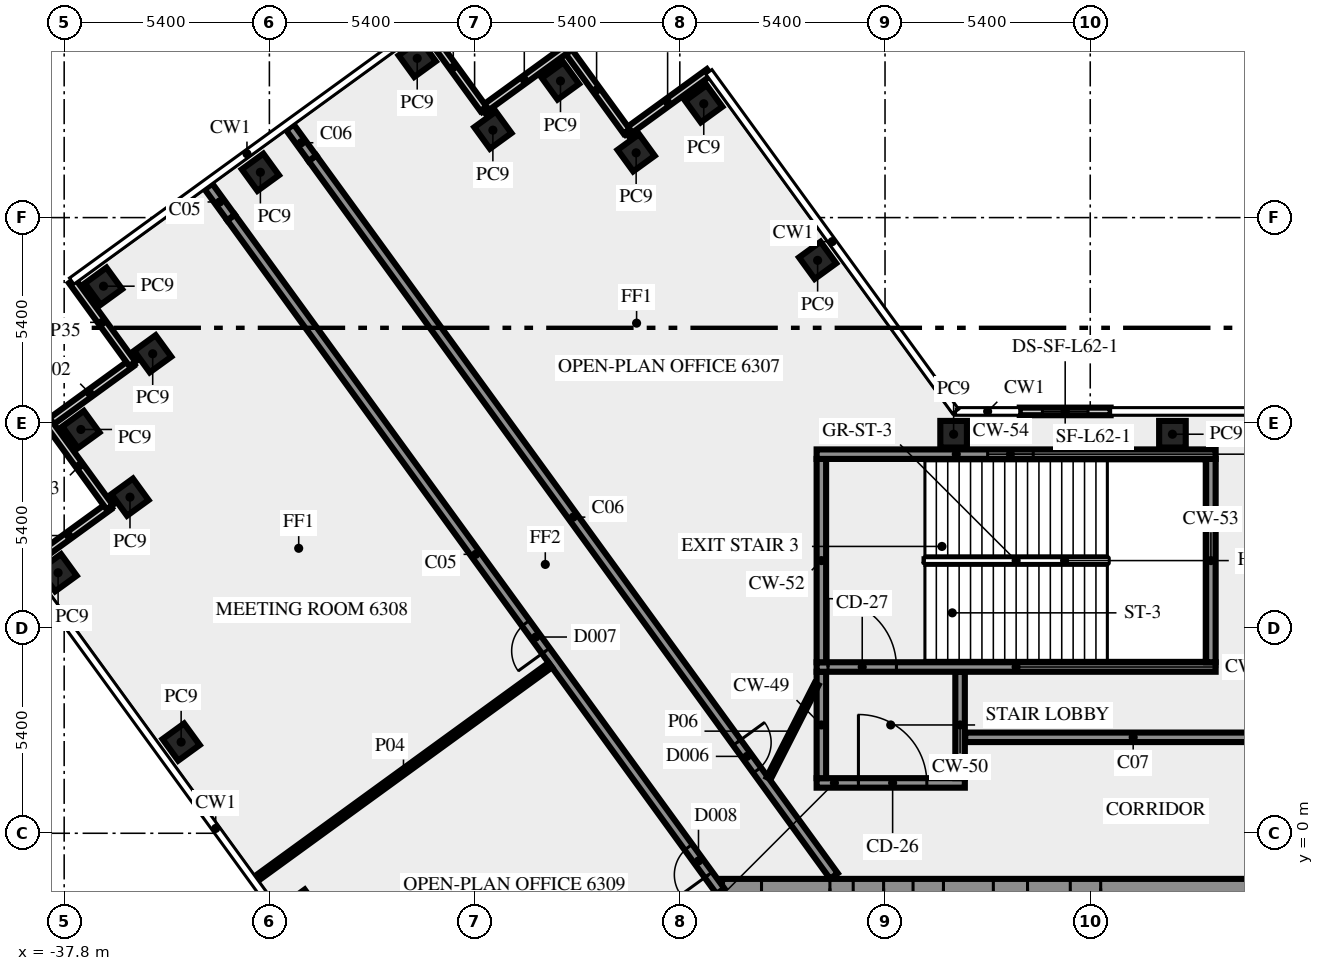
"""IFC4 building model, lengths in metres.
Left out: names, types, materials, properties, quantities, classifications, styles, units other than length and angle.
Written with IfcOpenShell. Run it as: python <this file> out.ifc"""

import sys

from ifc_helpers import new_model, si_unit, direction, frame, frame_2d, origin, origin_2d, place, context, subcontext, project, spatial, rectangle, extrude, element, fill, save


model = new_model("IFC4")
c1 = context("Model", 3, precision=1e-05, world=origin(), true_north=direction((0.0, 1.0)))
c2 = subcontext(c1, "Body", "Model", "MODEL_VIEW")
j1 = project(units=[si_unit("LENGTHUNIT", "METRE"), si_unit("PLANEANGLEUNIT", "RADIAN")], contexts=[c1])
p1 = place(None, origin())
s1 = spatial("IfcSite", under=j1, at=p1, CompositionType="ELEMENT")
p2 = place(p1, origin())
s2 = spatial("IfcBuilding", under=s1, at=p2, CompositionType="ELEMENT")
p3 = place(p2, frame((0.0, 0.0, 269.0)))
s3 = spatial("IfcBuildingStorey", under=s2, at=p3, CompositionType="ELEMENT", Elevation=269.0)
for number, where, z_axis, x_axis in (
    (1, (-17.974, 15.075, 0.0), (0.0, 0.0, 1.0), (-0.588, 0.809, 0.0)),
    (2, (-20.97, 19.195, 0.0), (0.0, 0.0, 1.0), (-0.588, 0.809, 0.0)),
    (3, (-22.749, 17.904, 0.0), (0.0, 0.0, 1.0), (-0.588, 0.809, 0.0)),
    (4, (-24.74, 19.795, 0.0), (0.0, 0.0, 1.0), (-0.588, 0.809, 0.0)),
    (5, (-26.519, 18.5, 0.0), (0.0, 0.0, 1.0), (-0.588, 0.809, 0.0)),
    (6, (-28.51, 20.39, 0.0), (0.0, 0.0, 1.0), (-0.809, -0.588, 0.0)),
    (7, (-32.637, 17.393, 0.0), (0.0, 0.0, 1.0), (-0.809, -0.588, 0.0)),
    (8, (-36.765, 14.395, 0.0), (0.0, 0.0, 1.0), (0.588, -0.809, 0.0)),
    (9, (-35.471, 12.616, 0.0), (0.0, 0.0, 1.0), (-0.809, -0.588, 0.0)),
    (10, (-37.36, 10.625, 0.0), (0.0, 0.0, 1.0), (0.588, -0.809, 0.0)),
    (11, (-36.068, 8.844, 0.0), (0.0, 0.0, 1.0), (0.588, -0.809, 0.0)),
    (12, (-37.96, 6.855, 0.0), (0.0, 0.0, 1.0), (0.588, -0.809, 0.0)),
    (13, (-34.722, 2.4, 0.0), (0.0, 0.0, 1.0), (0.588, -0.809, 0.0)),
    (14, (-31.548, -1.969, 0.0), (0.0, 0.0, 1.0), (0.588, -0.809, 0.0)),
    (15, (-8.637, 10.5, 0.0), (0.0, 0.0, 1.0), (-1.0, 0.0, 0.0)),
    (16, (-14.395, 10.5, 0.0), (0.0, 0.0, 1.0), (-1.0, 0.0, 0.0)),
):
    element("IfcColumn", number, at=place(p3, frame(where, z_axis=z_axis, x_axis=x_axis)), inside=s3, PredefinedType="COLUMN", context=c2, shape_type="SweptSolid", body=[
        extrude(rectangle(XDim=0.7, YDim=0.7, at=origin_2d()), origin(), (0.0, 0.0, 1.0), 3.5),
    ])
p4 = place(p3, frame((-36.629, 8.597, 0.0), z_axis=(0.0, 0.0, 1.0), x_axis=(-0.80901210161, -0.587791986546, 0.0)))
e17 = element("IfcWall", 17, at=p4, inside=s3, PredefinedType="SOLIDWALL", context=c2, shape_type="SweptSolid", body=[
    extrude(rectangle(XDim=2.6, YDim=0.2, at=frame_2d((1.3, 0.0))), origin(), (0.0, 0.0, 1.0), 3.5),
])
for number, where, z_axis, x_axis in (
    (18, (-36.032, 12.369, 0.0), (0.0, 0.0, 1.0), (-0.809, -0.588, 0.0)),
    (19, (-38.189, 10.765, 0.0), (0.0, 0.0, 1.0), (0.588, -0.809, 0.0)),
):
    element("IfcWall", number, at=place(p3, frame(where, z_axis=z_axis, x_axis=x_axis)), inside=s3, PredefinedType="SOLIDWALL", context=c2, shape_type="SweptSolid", body=[
        extrude(rectangle(XDim=2.7, YDim=0.2, at=frame_2d((1.35, 0.0))), origin(), (0.0, 0.0, 1.0), 3.5),
    ])
p5 = place(p3, frame((-10.263, 11.1, 0.0), z_axis=(0.0, 0.0, 1.0), x_axis=(-1.0, 0.0, 0.0)))
e20 = element("IfcWall", 20, at=p5, inside=s3, PredefinedType="SOLIDWALL", context=c2, shape_type="SweptSolid", body=[
    extrude(rectangle(XDim=2.392, YDim=0.2, at=frame_2d((1.196, 0.0))), origin(), (0.0, 0.0, 1.0), 3.5),
])
p6 = place(p5, frame((0.596, 0.0, 1.0)))
e21 = element("IfcOpeningElement", 21, at=p6, cuts=e20, PredefinedType="OPENING", context=c2, shape_type="SweptSolid", body=[
    extrude(rectangle(XDim=1.2, YDim=1.2, at=frame_2d((0.6, 0.6))), frame((0.0, 0.11, 0.0), z_axis=(0.0, -1.0, 0.0), x_axis=(1.0, 0.0, 0.0)), (0.0, 0.0, 1.0), 0.22),
])
for number, where, z_axis, x_axis in (
    (22, (-20.829, 20.025, 0.0), (0.0, 0.0, 1.0), (-0.809, -0.588, 0.0)),
    (23, (-22.996, 18.466, 0.0), (0.0, 0.0, 1.0), (-0.588, 0.809, 0.0)),
):
    element("IfcWall", number, at=place(p3, frame(where, z_axis=z_axis, x_axis=x_axis)), inside=s3, PredefinedType="SOLIDWALL", context=c2, shape_type="SweptSolid", body=[
        extrude(rectangle(XDim=2.7, YDim=0.2, at=frame_2d((1.35, 0.0))), origin(), (0.0, 0.0, 1.0), 3.5),
    ])
for number, where, z_axis, x_axis in (
    (24, (-24.6, 20.623, 0.0), (0.0, 0.0, 1.0), (-0.809, -0.588, 0.0)),
    (25, (-26.768, 19.063, 0.0), (0.0, 0.0, 1.0), (-0.588, 0.809, 0.0)),
):
    element("IfcWall", number, at=place(p3, frame(where, z_axis=z_axis, x_axis=x_axis)), inside=s3, PredefinedType="SOLIDWALL", context=c2, shape_type="SweptSolid", body=[
        extrude(rectangle(XDim=2.7, YDim=0.2, at=frame_2d((1.35, 0.0))), origin(), (0.0, 0.0, 1.0), 3.5),
    ])
p7 = place(p3, frame((-37.592, 14.536, 0.0), z_axis=(0.0, 0.0, 1.0), x_axis=(0.587762999008, -0.809033161865, 0.0)))
e26 = element("IfcWall", 26, at=p7, inside=s3, PredefinedType="SOLIDWALL", context=c2, shape_type="SweptSolid", body=[
    extrude(rectangle(XDim=2.7, YDim=0.2, at=frame_2d((1.35, 0.0))), origin(), (0.0, 0.0, 1.0), 3.5),
])
p8 = place(p3, frame((20.49, -1.45, 0.0), z_axis=(0.0, 0.0, 1.0), x_axis=(-1.0, 0.0, 0.0)))
e27 = element("IfcWall", 27, at=p8, inside=s3, PredefinedType="SHEAR", context=c2, shape_type="SweptSolid", body=[
    extrude(rectangle(XDim=40.98, YDim=0.5, at=frame_2d((20.49, 0.0))), origin(), (0.0, 0.0, 1.0), 3.5),
])
p9 = place(p8, frame((38.14, 0.0, 0.0)))
e28 = element("IfcOpeningElement", 28, at=p9, cuts=e27, PredefinedType="OPENING", context=c2, shape_type="SweptSolid", body=[
    extrude(rectangle(XDim=1.8, YDim=2.1, at=frame_2d((0.9, 1.05))), frame((0.0, 0.26, 0.0), z_axis=(0.0, -1.0, 0.0), x_axis=(1.0, 0.0, 0.0)), (0.0, 0.0, 1.0), 0.52),
])
p10 = place(p8, frame((36.728, 0.0, 0.0)))
e29 = element("IfcOpeningElement", 29, at=p10, cuts=e27, PredefinedType="OPENING", context=c2, shape_type="SweptSolid", body=[
    extrude(rectangle(XDim=0.8, YDim=2.1, at=frame_2d((0.4, 1.05))), frame((0.0, 0.26, 0.0), z_axis=(0.0, -1.0, 0.0), x_axis=(1.0, 0.0, 0.0)), (0.0, 0.0, 1.0), 0.52),
])
p11 = place(p8, frame((35.153, 0.0, 0.0)))
e30 = element("IfcOpeningElement", 30, at=p11, cuts=e27, PredefinedType="OPENING", context=c2, shape_type="SweptSolid", body=[
    extrude(rectangle(XDim=0.8, YDim=2.1, at=frame_2d((0.4, 1.05))), frame((0.0, 0.26, 0.0), z_axis=(0.0, -1.0, 0.0), x_axis=(1.0, 0.0, 0.0)), (0.0, 0.0, 1.0), 0.52),
])
p12 = place(p8, frame((32.94, 0.0, 0.0)))
e31 = element("IfcOpeningElement", 31, at=p12, cuts=e27, PredefinedType="OPENING", context=c2, shape_type="SweptSolid", body=[
    extrude(rectangle(XDim=0.9, YDim=2.1, at=frame_2d((0.45, 1.05))), frame((0.0, 0.26, 0.0), z_axis=(0.0, -1.0, 0.0), x_axis=(1.0, 0.0, 0.0)), (0.0, 0.0, 1.0), 0.52),
])
p13 = place(p8, frame((31.015, 0.0, 0.0)))
e32 = element("IfcOpeningElement", 32, at=p13, cuts=e27, PredefinedType="OPENING", context=c2, shape_type="SweptSolid", body=[
    extrude(rectangle(XDim=0.8, YDim=2.1, at=frame_2d((0.4, 1.05))), frame((0.0, 0.26, 0.0), z_axis=(0.0, -1.0, 0.0), x_axis=(1.0, 0.0, 0.0)), (0.0, 0.0, 1.0), 0.52),
])
p14 = place(p8, frame((24.765, 0.0, 0.0)))
e33 = element("IfcOpeningElement", 33, at=p14, cuts=e27, PredefinedType="OPENING", context=c2, shape_type="SweptSolid", body=[
    extrude(rectangle(XDim=0.8, YDim=2.1, at=frame_2d((0.4, 1.05))), frame((0.0, 0.26, 0.0), z_axis=(0.0, -1.0, 0.0), x_axis=(1.0, 0.0, 0.0)), (0.0, 0.0, 1.0), 0.52),
])
p15 = place(p8, frame((19.59, 0.0, 0.0)))
e34 = element("IfcOpeningElement", 34, at=p15, cuts=e27, PredefinedType="OPENING", context=c2, shape_type="SweptSolid", body=[
    extrude(rectangle(XDim=2.0, YDim=2.1, at=frame_2d((1.0, 1.05))), frame((0.0, 0.26, 0.0), z_axis=(0.0, -1.0, 0.0), x_axis=(1.0, 0.0, 0.0)), (0.0, 0.0, 1.0), 0.52),
])
p16 = place(p8, frame((13.202, 0.0, 0.0)))
e35 = element("IfcOpeningElement", 35, at=p16, cuts=e27, PredefinedType="OPENING", context=c2, shape_type="SweptSolid", body=[
    extrude(rectangle(XDim=0.9, YDim=2.1, at=frame_2d((0.45, 1.05))), frame((0.0, 0.26, 0.0), z_axis=(0.0, -1.0, 0.0), x_axis=(1.0, 0.0, 0.0)), (0.0, 0.0, 1.0), 0.52),
])
p17 = place(p8, frame((9.478, 0.0, 0.0)))
e36 = element("IfcOpeningElement", 36, at=p17, cuts=e27, PredefinedType="OPENING", context=c2, shape_type="SweptSolid", body=[
    extrude(rectangle(XDim=0.9, YDim=2.1, at=frame_2d((0.45, 1.05))), frame((0.0, 0.26, 0.0), z_axis=(0.0, -1.0, 0.0), x_axis=(1.0, 0.0, 0.0)), (0.0, 0.0, 1.0), 0.52),
])
p18 = place(p8, frame((7.14, 0.0, 0.0)))
e37 = element("IfcOpeningElement", 37, at=p18, cuts=e27, PredefinedType="OPENING", context=c2, shape_type="SweptSolid", body=[
    extrude(rectangle(XDim=0.9, YDim=2.1, at=frame_2d((0.45, 1.05))), frame((0.0, 0.26, 0.0), z_axis=(0.0, -1.0, 0.0), x_axis=(1.0, 0.0, 0.0)), (0.0, 0.0, 1.0), 0.52),
])
p19 = place(p8, frame((4.19, 0.0, 0.0)))
e38 = element("IfcOpeningElement", 38, at=p19, cuts=e27, PredefinedType="OPENING", context=c2, shape_type="SweptSolid", body=[
    extrude(rectangle(XDim=0.9, YDim=2.1, at=frame_2d((0.45, 1.05))), frame((0.0, 0.26, 0.0), z_axis=(0.0, -1.0, 0.0), x_axis=(1.0, 0.0, 0.0)), (0.0, 0.0, 1.0), 0.52),
])
p20 = place(p8, frame((1.04, 0.0, 0.0)))
e39 = element("IfcOpeningElement", 39, at=p20, cuts=e27, PredefinedType="OPENING", context=c2, shape_type="SweptSolid", body=[
    extrude(rectangle(XDim=1.8, YDim=2.1, at=frame_2d((0.9, 1.05))), frame((0.0, 0.26, 0.0), z_axis=(0.0, -1.0, 0.0), x_axis=(1.0, 0.0, 0.0)), (0.0, 0.0, 1.0), 0.52),
])
p21 = place(p3, frame((-18.0, 1.325, 0.0), z_axis=(0.0, 0.0, 1.0), x_axis=(1.0, 0.0, 0.0)))
e40 = element("IfcWall", 40, at=p21, inside=s3, PredefinedType="SHEAR", context=c2, shape_type="SweptSolid", body=[
    extrude(rectangle(XDim=3.9, YDim=0.25, at=frame_2d((1.95, 0.0))), origin(), (0.0, 0.0, 1.0), 3.5),
])
p22 = place(p21, frame((1.1, 0.0, 0.0)))
e41 = element("IfcOpeningElement", 41, at=p22, cuts=e40, PredefinedType="OPENING", context=c2, shape_type="SweptSolid", body=[
    extrude(rectangle(XDim=1.8, YDim=2.1, at=frame_2d((0.9, 1.05))), frame((0.0, 0.135, 0.0), z_axis=(0.0, -1.0, 0.0), x_axis=(1.0, 0.0, 0.0)), (0.0, 0.0, 1.0), 0.27),
])
for number, where, z_axis, x_axis in (
    (42, (-17.875, 1.45, 0.0), (0.0, 0.0, 1.0), (0.0, 1.0, 0.0)),
    (43, (-14.225, 1.45, 0.0), (0.0, 0.0, 1.0), (0.0, 1.0, 0.0)),
):
    element("IfcWall", number, at=place(p3, frame(where, z_axis=z_axis, x_axis=x_axis)), inside=s3, PredefinedType="SHEAR", context=c2, shape_type="SweptSolid", body=[
        extrude(rectangle(XDim=2.8, YDim=0.25, at=frame_2d((1.4, 0.0))), origin(), (0.0, 0.0, 1.0), 3.5),
    ])
p23 = place(p3, frame((-18.0, 4.375, 0.0), z_axis=(0.0, 0.0, 1.0), x_axis=(1.0, 0.0, 0.0)))
e44 = element("IfcWall", 44, at=p23, inside=s3, PredefinedType="SHEAR", context=c2, shape_type="SweptSolid", body=[
    extrude(rectangle(XDim=10.5, YDim=0.25, at=frame_2d((5.25, 0.0))), origin(), (0.0, 0.0, 1.0), 3.5),
])
p24 = place(p23, frame((0.3, 0.0, 0.0)))
e45 = element("IfcOpeningElement", 45, at=p24, cuts=e44, PredefinedType="OPENING", context=c2, shape_type="SweptSolid", body=[
    extrude(rectangle(XDim=1.8, YDim=2.1, at=frame_2d((0.9, 1.05))), frame((0.0, 0.135, 0.0), z_axis=(0.0, -1.0, 0.0), x_axis=(1.0, 0.0, 0.0)), (0.0, 0.0, 1.0), 0.27),
])
for number, where, z_axis, x_axis in (
    (46, (-17.875, 4.5, 0.0), (0.0, 0.0, 1.0), (0.0, 1.0, 0.0)),
    (47, (-7.625, 4.5, 0.0), (0.0, 0.0, 1.0), (0.0, 1.0, 0.0)),
):
    element("IfcWall", number, at=place(p3, frame(where, z_axis=z_axis, x_axis=x_axis)), inside=s3, PredefinedType="SHEAR", context=c2, shape_type="SweptSolid", body=[
        extrude(rectangle(XDim=5.35, YDim=0.25, at=frame_2d((2.675, 0.0))), origin(), (0.0, 0.0, 1.0), 3.5),
    ])
p25 = place(p3, frame((-18.0, 9.975, 0.0), z_axis=(0.0, 0.0, 1.0), x_axis=(1.0, 0.0, 0.0)))
e48 = element("IfcWall", 48, at=p25, inside=s3, PredefinedType="SHEAR", context=c2, shape_type="SweptSolid", body=[
    extrude(rectangle(XDim=10.5, YDim=0.25, at=frame_2d((5.25, 0.0))), origin(), (0.0, 0.0, 1.0), 3.5),
])
p26 = place(p25, frame((4.5, 0.0, 1.0)))
e49 = element("IfcOpeningElement", 49, at=p26, cuts=e48, PredefinedType="OPENING", context=c2, shape_type="SweptSolid", body=[
    extrude(rectangle(XDim=1.2, YDim=1.2, at=frame_2d((0.6, 0.6))), frame((0.0, 0.135, 0.0), z_axis=(0.0, -1.0, 0.0), x_axis=(1.0, 0.0, 0.0)), (0.0, 0.0, 1.0), 0.27),
])
p27 = place(p3, frame((-20.531, -1.523, 0.0), z_axis=(0.0, 0.0, 1.0), x_axis=(-0.587786711753, 0.809015934013, 0.0)))
e50 = element("IfcWall", 50, at=p27, inside=s3, PredefinedType="SOLIDWALL", context=c2, shape_type="SweptSolid", body=[
    extrude(rectangle(XDim=21.911, YDim=0.25, at=frame_2d((10.956, 0.0))), origin(), (0.0, 0.0, 1.0), 3.5),
])
p28 = place(p27, frame((0.533, 0.0, 0.0)))
e51 = element("IfcOpeningElement", 51, at=p28, cuts=e50, PredefinedType="OPENING", context=c2, shape_type="SweptSolid", body=[
    extrude(rectangle(XDim=0.9, YDim=2.1, at=frame_2d((0.45, 1.05))), frame((0.0, 0.135, 0.0), z_axis=(0.0, -1.0, 0.0), x_axis=(1.0, 0.0, 0.0)), (0.0, 0.0, 1.0), 0.27),
])
p29 = place(p27, frame((7.816, 0.0, 0.0)))
e52 = element("IfcOpeningElement", 52, at=p29, cuts=e50, PredefinedType="OPENING", context=c2, shape_type="SweptSolid", body=[
    extrude(rectangle(XDim=0.9, YDim=2.1, at=frame_2d((0.45, 1.05))), frame((0.0, 0.135, 0.0), z_axis=(0.0, -1.0, 0.0), x_axis=(1.0, 0.0, 0.0)), (0.0, 0.0, 1.0), 0.27),
])
p30 = place(p3, frame((-31.267, 17.762, 0.0), z_axis=(0.0, 0.0, 1.0), x_axis=(0.587787966774, -0.809015022181, 0.0)))
e53 = element("IfcWall", 53, at=p30, inside=s3, PredefinedType="SOLIDWALL", context=c2, shape_type="SweptSolid", body=[
    extrude(rectangle(XDim=23.345, YDim=0.25, at=frame_2d((11.672, 0.0))), origin(), (0.0, 0.0, 1.0), 3.5),
])
p31 = place(p30, frame((19.004, 0.0, 0.0)))
e54 = element("IfcOpeningElement", 54, at=p31, cuts=e53, PredefinedType="OPENING", context=c2, shape_type="SweptSolid", body=[
    extrude(rectangle(XDim=0.9, YDim=2.1, at=frame_2d((0.45, 1.05))), frame((0.0, 0.135, 0.0), z_axis=(0.0, -1.0, 0.0), x_axis=(1.0, 0.0, 0.0)), (0.0, 0.0, 1.0), 0.27),
])
p32 = place(p3, frame((-14.09, 2.525, 0.0), z_axis=(0.0, 0.0, 1.0), x_axis=(1.0, 0.0, 0.0)))
e55 = element("IfcWall", 55, at=p32, inside=s3, PredefinedType="SOLIDWALL", context=c2, shape_type="SweptSolid", body=[
    extrude(rectangle(XDim=8.84, YDim=0.25, at=frame_2d((4.42, 0.0))), origin(), (0.0, 0.0, 1.0), 3.5),
])
p33 = place(p3, frame((-25.008, 4.427, 0.0), z_axis=(0.0, 0.0, 1.0), x_axis=(-0.808994684961, -0.587815957341, 0.0)))
e56 = element("IfcWall", 56, at=p33, inside=s3, PredefinedType="PARTITIONING", context=c2, shape_type="SweptSolid", body=[
    extrude(rectangle(XDim=9.55, YDim=0.15, at=frame_2d((4.775, 0.0))), origin(), (0.0, 0.0, 1.0), 2.8),
])
p34 = place(p3, frame((-19.261, 1.45, 0.0), z_axis=(0.0, 0.0, 1.0), x_axis=(0.453950796792, 0.891026752736, 0.0)))
e57 = element("IfcWall", 57, at=p34, inside=s3, PredefinedType="PARTITIONING", context=c2, shape_type="SweptSolid", body=[
    extrude(rectangle(XDim=2.778, YDim=0.12, at=frame_2d((1.389, 0.0))), origin(), (0.0, 0.0, 1.0), 3.5),
])
p35 = place(p3, frame((-33.41, 16.203, 0.0), z_axis=(0.0, 0.0, 1.0), x_axis=(-0.587696850957, 0.809081214326, 0.0)))
e58 = element("IfcWall", 58, at=p35, inside=s3, PredefinedType="SOLIDWALL", context=c2, shape_type="SweptSolid", body=[
    extrude(rectangle(XDim=1.009, YDim=0.25, at=frame_2d((0.504, 0.0))), origin(), (0.0, 0.0, 1.0), 2.8),
])
p36 = place(p3, frame((-31.267, 17.762, 0.0), z_axis=(0.0, 0.0, 1.0), x_axis=(-0.587840411638, 0.808976915892, 0.0)))
e59 = element("IfcWall", 59, at=p36, inside=s3, PredefinedType="SOLIDWALL", context=c2, shape_type="SweptSolid", body=[
    extrude(rectangle(XDim=1.008, YDim=0.25, at=frame_2d((0.504, 0.0))), origin(), (0.0, 0.0, 1.0), 2.8),
])
p37 = place(p6, origin())
e60 = element("IfcWindow", 60, at=p37, inside=s3, PartitioningType="SINGLE_PANEL", PredefinedType="WINDOW", context=c2, shape_type="SweptSolid", body=[
    extrude(rectangle(XDim=1.2, YDim=1.2, at=frame_2d((0.6, 0.6))), frame((0.0, 0.03, 0.0), z_axis=(0.0, -1.0, 0.0), x_axis=(1.0, 0.0, 0.0)), (0.0, 0.0, 1.0), 0.06),
])
fill(e21, e60)
p38 = place(p9, origin())
e61 = element("IfcDoor", 61, at=p38, inside=s3, OperationType="DOUBLE_DOOR_SINGLE_SWING", PredefinedType="DOOR", context=c2, shape_type="SweptSolid", body=[
    extrude(rectangle(XDim=1.8, YDim=2.1, at=frame_2d((0.9, 1.05))), frame((0.0, 0.025, 0.0), z_axis=(0.0, -1.0, 0.0), x_axis=(1.0, 0.0, 0.0)), (0.0, 0.0, 1.0), 0.05),
])
fill(e28, e61)
p39 = place(p10, origin())
e62 = element("IfcDoor", 62, at=p39, inside=s3, OperationType="SINGLE_SWING_RIGHT", PredefinedType="DOOR", context=c2, shape_type="SweptSolid", body=[
    extrude(rectangle(XDim=0.8, YDim=2.1, at=frame_2d((0.4, 1.05))), frame((0.0, 0.025, 0.0), z_axis=(0.0, -1.0, 0.0), x_axis=(1.0, 0.0, 0.0)), (0.0, 0.0, 1.0), 0.05),
])
fill(e29, e62)
p40 = place(p11, origin())
e63 = element("IfcDoor", 63, at=p40, inside=s3, OperationType="SINGLE_SWING_RIGHT", PredefinedType="DOOR", context=c2, shape_type="SweptSolid", body=[
    extrude(rectangle(XDim=0.8, YDim=2.1, at=frame_2d((0.4, 1.05))), frame((0.0, 0.025, 0.0), z_axis=(0.0, -1.0, 0.0), x_axis=(1.0, 0.0, 0.0)), (0.0, 0.0, 1.0), 0.05),
])
fill(e30, e63)
p41 = place(p12, origin())
e64 = element("IfcDoor", 64, at=p41, inside=s3, OperationType="SINGLE_SWING_RIGHT", PredefinedType="DOOR", context=c2, shape_type="SweptSolid", body=[
    extrude(rectangle(XDim=0.9, YDim=2.1, at=frame_2d((0.45, 1.05))), frame((0.0, 0.025, 0.0), z_axis=(0.0, -1.0, 0.0), x_axis=(1.0, 0.0, 0.0)), (0.0, 0.0, 1.0), 0.05),
])
fill(e31, e64)
p42 = place(p13, origin())
e65 = element("IfcDoor", 65, at=p42, inside=s3, OperationType="SINGLE_SWING_RIGHT", PredefinedType="DOOR", context=c2, shape_type="SweptSolid", body=[
    extrude(rectangle(XDim=0.8, YDim=2.1, at=frame_2d((0.4, 1.05))), frame((0.0, 0.025, 0.0), z_axis=(0.0, -1.0, 0.0), x_axis=(1.0, 0.0, 0.0)), (0.0, 0.0, 1.0), 0.05),
])
fill(e32, e65)
p43 = place(p22, origin())
e66 = element("IfcDoor", 66, at=p43, inside=s3, OperationType="DOUBLE_DOOR_SINGLE_SWING", PredefinedType="DOOR", context=c2, shape_type="SweptSolid", body=[
    extrude(rectangle(XDim=1.8, YDim=2.1, at=frame_2d((0.9, 1.05))), frame((0.0, 0.025, 0.0), z_axis=(0.0, -1.0, 0.0), x_axis=(1.0, 0.0, 0.0)), (0.0, 0.0, 1.0), 0.05),
])
fill(e41, e66)
p44 = place(p24, origin())
e67 = element("IfcDoor", 67, at=p44, inside=s3, OperationType="DOUBLE_DOOR_SINGLE_SWING", PredefinedType="DOOR", context=c2, shape_type="SweptSolid", body=[
    extrude(rectangle(XDim=1.8, YDim=2.1, at=frame_2d((0.9, 1.05))), frame((0.0, 0.025, 0.0), z_axis=(0.0, -1.0, 0.0), x_axis=(1.0, 0.0, 0.0)), (0.0, 0.0, 1.0), 0.05),
])
fill(e45, e67)
p45 = place(p26, origin())
e68 = element("IfcWindow", 68, at=p45, inside=s3, PartitioningType="SINGLE_PANEL", PredefinedType="WINDOW", context=c2, shape_type="SweptSolid", body=[
    extrude(rectangle(XDim=1.2, YDim=1.2, at=frame_2d((0.6, 0.6))), frame((0.0, 0.03, 0.0), z_axis=(0.0, -1.0, 0.0), x_axis=(1.0, 0.0, 0.0)), (0.0, 0.0, 1.0), 0.06),
])
fill(e49, e68)
p46 = place(p31, origin())
e69 = element("IfcDoor", 69, at=p46, inside=s3, OperationType="SINGLE_SWING_RIGHT", PredefinedType="DOOR", context=c2, shape_type="SweptSolid", body=[
    extrude(rectangle(XDim=0.9, YDim=2.1, at=frame_2d((0.45, 1.05))), frame((0.0, 0.025, 0.0), z_axis=(0.0, -1.0, 0.0), x_axis=(1.0, 0.0, 0.0)), (0.0, 0.0, 1.0), 0.05),
])
fill(e54, e69)
p47 = place(p28, origin())
e70 = element("IfcDoor", 70, at=p47, inside=s3, OperationType="SINGLE_SWING_LEFT", PredefinedType="DOOR", context=c2, shape_type="SweptSolid", body=[
    extrude(rectangle(XDim=0.9, YDim=2.1, at=frame_2d((0.45, 1.05))), frame((0.0, 0.025, 0.0), z_axis=(0.0, -1.0, 0.0), x_axis=(1.0, 0.0, 0.0)), (0.0, 0.0, 1.0), 0.05),
])
fill(e51, e70)
p48 = place(p29, origin())
e71 = element("IfcDoor", 71, at=p48, inside=s3, OperationType="SINGLE_SWING_LEFT", PredefinedType="DOOR", context=c2, shape_type="SweptSolid", body=[
    extrude(rectangle(XDim=0.9, YDim=2.1, at=frame_2d((0.45, 1.05))), frame((0.0, 0.025, 0.0), z_axis=(0.0, -1.0, 0.0), x_axis=(1.0, 0.0, 0.0)), (0.0, 0.0, 1.0), 0.05),
])
fill(e52, e71)
save(model, sys.argv[1])
